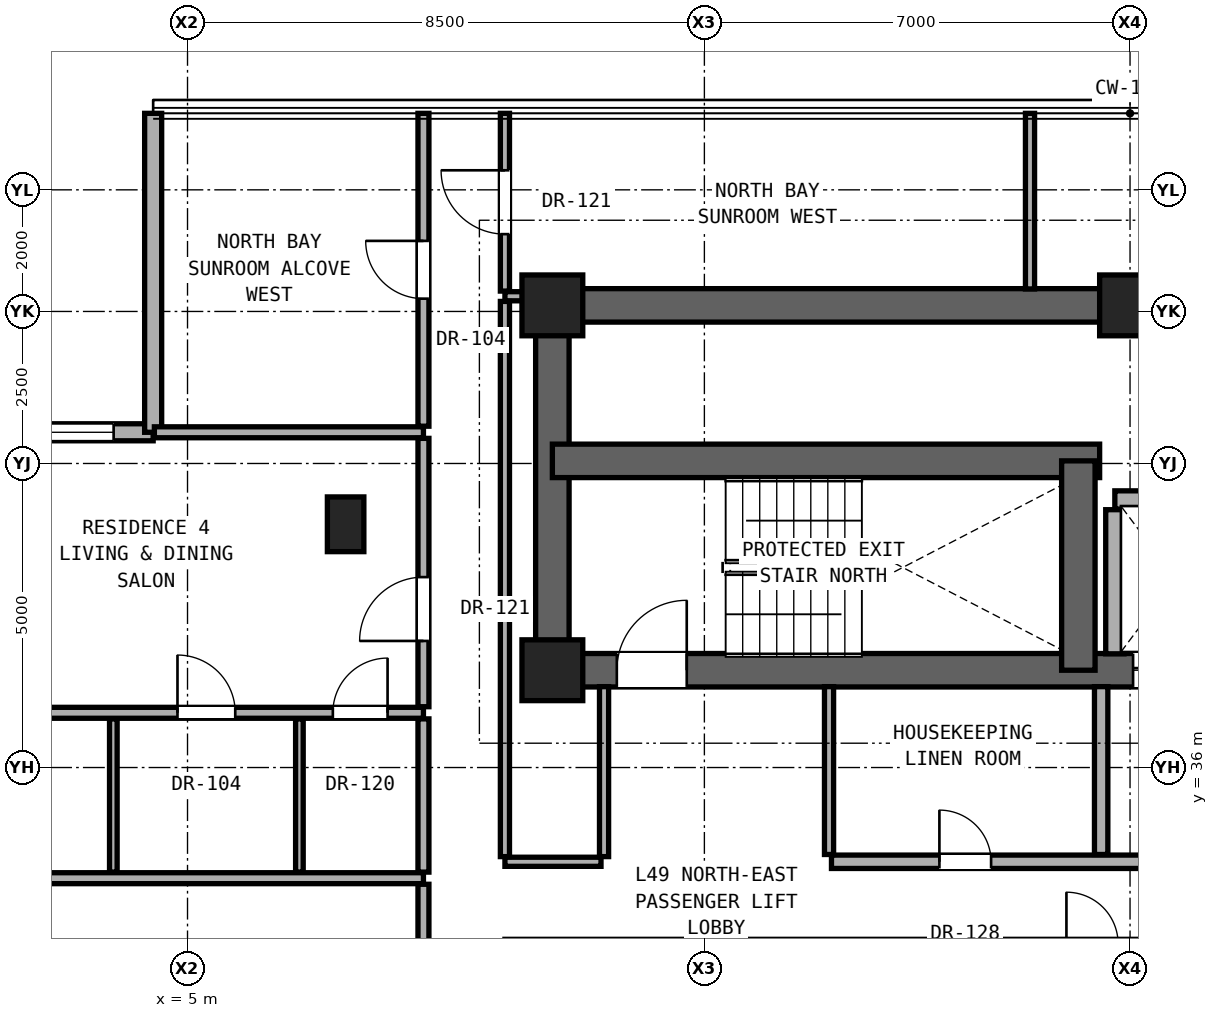
"""IFC4 building model, lengths in metres.
Left out: names, types, materials, properties, quantities, classifications, styles, units other than length and angle.
Written with IfcOpenShell. Run it as: python <this file> out.ifc"""

import sys

from ifc_helpers import new_model, si_unit, direction, frame, frame_2d, origin, origin_2d, place, context, subcontext, project, spatial, rectangle, extrude, element, fill, save


model = new_model("IFC4")
c1 = context("Model", 3, precision=1e-05, world=origin(), true_north=direction((0.0, 1.0)))
c2 = subcontext(c1, "Body", "Model", "MODEL_VIEW")
j1 = project(units=[si_unit("LENGTHUNIT", "METRE"), si_unit("PLANEANGLEUNIT", "RADIAN")], contexts=[c1])
p1 = place(None, origin())
s1 = spatial("IfcSite", under=j1, at=p1, CompositionType="ELEMENT")
p2 = place(p1, origin())
s2 = spatial("IfcBuilding", under=s1, at=p2, CompositionType="ELEMENT")
p3 = place(p2, frame((0.0, 0.0, 173.9)))
s3 = spatial("IfcBuildingStorey", under=s2, at=p3, CompositionType="ELEMENT", Elevation=173.9)
for number, where, z_axis, x_axis in (
    (1, (11.0, 37.6, 0.0), (0.0, 0.0, 1.0), (1.0, 0.0, 0.0)),
    (2, (11.0, 43.6, 0.0), (0.0, 0.0, 1.0), (1.0, 0.0, 0.0)),
    (3, (20.5, 43.6, 0.0), (0.0, 0.0, 1.0), (1.0, 0.0, 0.0)),
):
    element("IfcColumn", number, at=place(p3, frame(where, z_axis=z_axis, x_axis=x_axis)), inside=s3, PredefinedType="COLUMN", context=c2, shape_type="SweptSolid", body=[
        extrude(rectangle(XDim=1.0, YDim=1.0, at=origin_2d()), origin(), (0.0, 0.0, 1.0), 3.25),
    ])
p4 = place(p3, frame((7.6, 40.0, 0.0), z_axis=(0.0, 0.0, 1.0), x_axis=(1.0, 0.0, 0.0)))
e4 = element("IfcColumn", 4, at=p4, inside=s3, PredefinedType="PILASTER", context=c2, shape_type="SweptSolid", body=[
    extrude(rectangle(XDim=0.6, YDim=0.9, at=origin_2d()), origin(), (0.0, 0.0, 1.0), 3.25),
])
p5 = place(p3, frame((11.0, 43.6, 0.0), z_axis=(0.0, 0.0, 1.0), x_axis=(1.0, 0.0, 0.0)))
e5 = element("IfcWall", 5, at=p5, inside=s3, PredefinedType="SHEAR", context=c2, shape_type="SweptSolid", body=[
    extrude(rectangle(XDim=19.0, YDim=0.55, at=frame_2d((9.5, 0.0))), origin(), (0.0, 0.0, 1.0), 3.05),
])
p6 = place(p3, frame((11.0, 37.6, 0.0), z_axis=(0.0, 0.0, 1.0), x_axis=(0.0, 1.0, 0.0)))
e6 = element("IfcWall", 6, at=p6, inside=s3, PredefinedType="SHEAR", context=c2, shape_type="SweptSolid", body=[
    extrude(rectangle(XDim=6.0, YDim=0.55, at=frame_2d((3.0, 0.0))), origin(), (0.0, 0.0, 1.0), 3.05),
])
p7 = place(p3, frame((11.0, 37.6, 0.0), z_axis=(0.0, 0.0, 1.0), x_axis=(1.0, 0.0, 0.0)))
e7 = element("IfcWall", 7, at=p7, inside=s3, PredefinedType="SHEAR", context=c2, shape_type="SweptSolid", body=[
    extrude(rectangle(XDim=19.0, YDim=0.55, at=frame_2d((9.5, 0.0))), origin(), (0.0, 0.0, 1.0), 3.05),
])
p8 = place(p7, frame((1.06, 0.0, 0.0)))
e8 = element("IfcOpeningElement", 8, at=p8, cuts=e7, PredefinedType="OPENING", context=c2, shape_type="SweptSolid", body=[
    extrude(rectangle(XDim=1.15, YDim=2.2, at=frame_2d((0.575, 1.1))), frame((0.0, 0.285, 0.0), z_axis=(0.0, -1.0, 0.0), x_axis=(1.0, 0.0, 0.0)), (0.0, 0.0, 1.0), 0.57),
])
p9 = place(p7, frame((9.55, 0.0, 0.0)))
e9 = element("IfcOpeningElement", 9, at=p9, cuts=e7, PredefinedType="OPENING", context=c2, shape_type="SweptSolid", body=[
    extrude(rectangle(XDim=1.4, YDim=2.35, at=frame_2d((0.7, 1.175))), frame((0.0, 0.285, 0.0), z_axis=(0.0, -1.0, 0.0), x_axis=(1.0, 0.0, 0.0)), (0.0, 0.0, 1.0), 0.57),
])
p10 = place(p7, frame((11.95, 0.0, 0.0)))
e10 = element("IfcOpeningElement", 10, at=p10, cuts=e7, PredefinedType="OPENING", context=c2, shape_type="SweptSolid", body=[
    extrude(rectangle(XDim=1.4, YDim=2.35, at=frame_2d((0.7, 1.175))), frame((0.0, 0.285, 0.0), z_axis=(0.0, -1.0, 0.0), x_axis=(1.0, 0.0, 0.0)), (0.0, 0.0, 1.0), 0.57),
])
p11 = place(p3, frame((11.0, 41.043, 0.0), z_axis=(0.0, 0.0, 1.0), x_axis=(1.0, 0.0, 0.0)))
e11 = element("IfcWall", 11, at=p11, inside=s3, PredefinedType="SHEAR", context=c2, shape_type="SweptSolid", body=[
    extrude(rectangle(XDim=9.0, YDim=0.55, at=frame_2d((4.5, 0.0))), origin(), (0.0, 0.0, 1.0), 3.05),
])
p12 = place(p3, frame((19.65, 37.6, 0.0), z_axis=(0.0, 0.0, 1.0), x_axis=(0.0, 1.0, 0.0)))
e12 = element("IfcWall", 12, at=p12, inside=s3, PredefinedType="SHEAR", context=c2, shape_type="SweptSolid", body=[
    extrude(rectangle(XDim=3.443, YDim=0.55, at=frame_2d((1.721, 0.0))), origin(), (0.0, 0.0, 1.0), 3.05),
])
p13 = place(p3, frame((4.435, 41.513, 0.0), z_axis=(0.0, 0.0, 1.0), x_axis=(-1.0, 0.0, 0.0)))
e13 = element("IfcWall", 13, at=p13, inside=s3, PredefinedType="SOLIDWALL", context=c2, shape_type="SweptSolid", body=[
    extrude(rectangle(XDim=5.245, YDim=0.28, at=frame_2d((2.623, 0.0))), origin(), (0.0, 0.0, 1.0), 3.03),
])
p14 = place(p13, frame((0.65, 0.0, 0.85)))
e14 = element("IfcOpeningElement", 14, at=p14, cuts=e13, PredefinedType="OPENING", context=c2, shape_type="SweptSolid", body=[
    extrude(rectangle(XDim=1.1, YDim=2.0, at=frame_2d((0.55, 1.0))), frame((0.0, 0.15, 0.0), z_axis=(0.0, -1.0, 0.0), x_axis=(1.0, 0.0, 0.0)), (0.0, 0.0, 1.0), 0.3),
])
p15 = place(p3, frame((4.435, 46.758, 0.0), z_axis=(0.0, 0.0, 1.0), x_axis=(0.0, -1.0, 0.0)))
e15 = element("IfcWall", 15, at=p15, inside=s3, PredefinedType="SOLIDWALL", context=c2, shape_type="SweptSolid", body=[
    extrude(rectangle(XDim=5.245, YDim=0.28, at=frame_2d((2.623, 0.0))), origin(), (0.0, 0.0, 1.0), 3.03),
])
p16 = place(p3, frame((-0.81, 34.18, 0.0), z_axis=(0.0, 0.0, 1.0), x_axis=(1.0, 0.0, 0.0)))
e16 = element("IfcWall", 16, at=p16, inside=s3, PredefinedType="PARTITIONING", context=c2, shape_type="SweptSolid", body=[
    extrude(rectangle(XDim=9.69, YDim=0.18, at=frame_2d((4.845, 0.0))), origin(), (0.0, 0.0, 1.0), 2.269),
])
p17 = place(p3, frame((10.22, 34.45, 0.0), z_axis=(0.0, 0.0, 1.0), x_axis=(1.0, 0.0, 0.0)))
e17 = element("IfcWall", 17, at=p17, inside=s3, PredefinedType="PARTITIONING", context=c2, shape_type="SweptSolid", body=[
    extrude(rectangle(XDim=1.58, YDim=0.15, at=frame_2d((0.79, 0.0))), origin(), (0.0, 0.0, 1.0), 2.186),
])
p18 = place(p3, frame((15.59, 34.45, 0.0), z_axis=(0.0, 0.0, 1.0), x_axis=(1.0, 0.0, 0.0)))
e18 = element("IfcWall", 18, at=p18, inside=s3, PredefinedType="SOLIDWALL", context=c2, shape_type="SweptSolid", body=[
    extrude(rectangle(XDim=15.19, YDim=0.22, at=frame_2d((7.595, 0.0))), origin(), (0.0, 0.0, 1.0), 2.186),
])
p19 = place(p18, frame((6.435, 0.0, 0.0)))
e19 = element("IfcOpeningElement", 19, at=p19, cuts=e18, PredefinedType="OPENING", context=c2, shape_type="SweptSolid", body=[
    extrude(rectangle(XDim=0.85, YDim=2.01, at=frame_2d((0.425, 1.005))), frame((0.0, 0.12, 0.0), z_axis=(0.0, -1.0, 0.0), x_axis=(1.0, 0.0, 0.0)), (0.0, 0.0, 1.0), 0.24),
])
p20 = place(p18, frame((11.085, 0.0, 0.0)))
e20 = element("IfcOpeningElement", 20, at=p20, cuts=e18, PredefinedType="OPENING", context=c2, shape_type="SweptSolid", body=[
    extrude(rectangle(XDim=0.95, YDim=2.15, at=frame_2d((0.475, 1.075))), frame((0.0, 0.12, 0.0), z_axis=(0.0, -1.0, 0.0), x_axis=(1.0, 0.0, 0.0)), (0.0, 0.0, 1.0), 0.24),
])
p21 = place(p18, frame((1.775, 0.0, 0.0)))
e21 = element("IfcOpeningElement", 21, at=p21, cuts=e18, PredefinedType="OPENING", context=c2, shape_type="SweptSolid", body=[
    extrude(rectangle(XDim=0.85, YDim=2.01, at=frame_2d((0.425, 1.005))), frame((0.0, 0.12, 0.0), z_axis=(0.0, -1.0, 0.0), x_axis=(1.0, 0.0, 0.0)), (0.0, 0.0, 1.0), 0.24),
])
p22 = place(p3, frame((-0.81, 36.9, 0.0), z_axis=(0.0, 0.0, 1.0), x_axis=(1.0, 0.0, 0.0)))
e22 = element("IfcWall", 22, at=p22, inside=s3, PredefinedType="PARTITIONING", context=c2, shape_type="SweptSolid", body=[
    extrude(rectangle(XDim=9.69, YDim=0.18, at=frame_2d((4.845, 0.0))), origin(), (0.0, 0.0, 1.0), 2.269),
])
p23 = place(p22, frame((1.24, 0.0, 0.0)))
e23 = element("IfcOpeningElement", 23, at=p23, cuts=e22, PredefinedType="OPENING", context=c2, shape_type="SweptSolid", body=[
    extrude(rectangle(XDim=0.95, YDim=2.15, at=frame_2d((0.475, 1.075))), frame((0.0, 0.1, 0.0), z_axis=(0.0, -1.0, 0.0), x_axis=(1.0, 0.0, 0.0)), (0.0, 0.0, 1.0), 0.2),
])
p24 = place(p22, frame((5.645, 0.0, 0.0)))
e24 = element("IfcOpeningElement", 24, at=p24, cuts=e22, PredefinedType="OPENING", context=c2, shape_type="SweptSolid", body=[
    extrude(rectangle(XDim=0.95, YDim=2.15, at=frame_2d((0.475, 1.075))), frame((0.0, 0.1, 0.0), z_axis=(0.0, -1.0, 0.0), x_axis=(1.0, 0.0, 0.0)), (0.0, 0.0, 1.0), 0.2),
])
p25 = place(p22, frame((8.2, 0.0, 0.0)))
e25 = element("IfcOpeningElement", 25, at=p25, cuts=e22, PredefinedType="OPENING", context=c2, shape_type="SweptSolid", body=[
    extrude(rectangle(XDim=0.9, YDim=2.1, at=frame_2d((0.45, 1.05))), frame((0.0, 0.1, 0.0), z_axis=(0.0, -1.0, 0.0), x_axis=(1.0, 0.0, 0.0)), (0.0, 0.0, 1.0), 0.2),
])
p26 = place(p3, frame((20.25, 40.4, 0.0), z_axis=(0.0, 0.0, 1.0), x_axis=(1.0, 0.0, 0.0)))
e26 = element("IfcWall", 26, at=p26, inside=s3, PredefinedType="SOLIDWALL", context=c2, shape_type="SweptSolid", body=[
    extrude(rectangle(XDim=4.4, YDim=0.3, at=frame_2d((2.2, 0.0))), origin(), (0.0, 0.0, 1.0), 3.05),
])
p27 = place(p3, frame((4.455, 41.513, 0.0), z_axis=(0.0, 0.0, 1.0), x_axis=(1.0, 0.0, 0.0)))
e27 = element("IfcWall", 27, at=p27, inside=s3, PredefinedType="PARTITIONING", context=c2, shape_type="SweptSolid", body=[
    extrude(rectangle(XDim=4.425, YDim=0.18, at=frame_2d((2.212, 0.0))), origin(), (0.0, 0.0, 1.0), 3.05),
])
p28 = place(p3, frame((10.22, 43.75, 0.0), z_axis=(0.0, 0.0, 1.0), x_axis=(1.0, 0.0, 0.0)))
e28 = element("IfcWall", 28, at=p28, inside=s3, PredefinedType="PARTITIONING", context=c2, shape_type="SweptSolid", body=[
    extrude(rectangle(XDim=0.51, YDim=0.15, at=frame_2d((0.255, 0.0))), origin(), (0.0, 0.0, 1.0), 3.05),
])
for number, where, z_axis, x_axis in (
    (29, (3.78, 34.28, 0.0), (0.0, 0.0, 1.0), (0.0, 1.0, 0.0)),
    (30, (6.84, 34.28, 0.0), (0.0, 0.0, 1.0), (0.0, 1.0, 0.0)),
):
    element("IfcWall", number, at=place(p3, frame(where, z_axis=z_axis, x_axis=x_axis)), inside=s3, PredefinedType="PARTITIONING", context=c2, shape_type="SweptSolid", body=[
        extrude(rectangle(XDim=2.52, YDim=0.125, at=frame_2d((1.26, 0.0))), origin(), (0.0, 0.0, 1.0), 3.05),
    ])
p29 = place(p3, frame((8.88, 30.633, 0.0), z_axis=(0.0, 0.0, 1.0), x_axis=(0.0, 1.0, 0.0)))
e31 = element("IfcWall", 31, at=p29, inside=s3, PredefinedType="PARTITIONING", context=c2, shape_type="SweptSolid", body=[
    extrude(rectangle(XDim=3.447, YDim=0.18, at=frame_2d((1.724, 0.0))), origin(), (0.0, 0.0, 1.0), 2.346),
])
p30 = place(p29, frame((1.198, 0.0, 0.0)))
e32 = element("IfcOpeningElement", 32, at=p30, cuts=e31, PredefinedType="OPENING", context=c2, shape_type="SweptSolid", body=[
    extrude(rectangle(XDim=1.05, YDim=2.2, at=frame_2d((0.525, 1.1))), frame((0.0, 0.1, 0.0), z_axis=(0.0, -1.0, 0.0), x_axis=(1.0, 0.0, 0.0)), (0.0, 0.0, 1.0), 0.2),
])
p31 = place(p3, frame((8.88, 34.28, 0.0), z_axis=(0.0, 0.0, 1.0), x_axis=(0.0, 1.0, 0.0)))
e33 = element("IfcWall", 33, at=p31, inside=s3, PredefinedType="PARTITIONING", context=c2, shape_type="SweptSolid", body=[
    extrude(rectangle(XDim=2.52, YDim=0.18, at=frame_2d((1.26, 0.0))), origin(), (0.0, 0.0, 1.0), 3.05),
])
p32 = place(p3, frame((8.88, 37.0, 0.0), z_axis=(0.0, 0.0, 1.0), x_axis=(0.0, 1.0, 0.0)))
e34 = element("IfcWall", 34, at=p32, inside=s3, PredefinedType="PARTITIONING", context=c2, shape_type="SweptSolid", body=[
    extrude(rectangle(XDim=4.413, YDim=0.18, at=frame_2d((2.207, 0.0))), origin(), (0.0, 0.0, 1.0), 2.442),
])
p33 = place(p32, frame((1.082, 0.0, 0.0)))
e35 = element("IfcOpeningElement", 35, at=p33, cuts=e34, PredefinedType="OPENING", context=c2, shape_type="SweptSolid", body=[
    extrude(rectangle(XDim=1.05, YDim=2.2, at=frame_2d((0.525, 1.1))), frame((0.0, 0.1, 0.0), z_axis=(0.0, -1.0, 0.0), x_axis=(1.0, 0.0, 0.0)), (0.0, 0.0, 1.0), 0.2),
])
p34 = place(p3, frame((8.88, 41.613, 0.0), z_axis=(0.0, 0.0, 1.0), x_axis=(0.0, 1.0, 0.0)))
e36 = element("IfcWall", 36, at=p34, inside=s3, PredefinedType="PARTITIONING", context=c2, shape_type="SweptSolid", body=[
    extrude(rectangle(XDim=5.145, YDim=0.18, at=frame_2d((2.573, 0.0))), origin(), (0.0, 0.0, 1.0), 3.05),
])
p35 = place(p34, frame((2.097, 0.0, 0.0)))
e37 = element("IfcOpeningElement", 37, at=p35, cuts=e36, PredefinedType="OPENING", context=c2, shape_type="SweptSolid", body=[
    extrude(rectangle(XDim=0.95, YDim=2.15, at=frame_2d((0.475, 1.075))), frame((0.0, 0.1, 0.0), z_axis=(0.0, -1.0, 0.0), x_axis=(1.0, 0.0, 0.0)), (0.0, 0.0, 1.0), 0.2),
])
p36 = place(p3, frame((10.22, 34.535, 0.0), z_axis=(0.0, 0.0, 1.0), x_axis=(0.0, 1.0, 0.0)))
e38 = element("IfcWall", 38, at=p36, inside=s3, PredefinedType="PARTITIONING", context=c2, shape_type="SweptSolid", body=[
    extrude(rectangle(XDim=9.13, YDim=0.15, at=frame_2d((4.565, 0.0))), origin(), (0.0, 0.0, 1.0), 2.442),
])
p37 = place(p3, frame((10.22, 43.835, 0.0), z_axis=(0.0, 0.0, 1.0), x_axis=(0.0, 1.0, 0.0)))
e39 = element("IfcWall", 39, at=p37, inside=s3, PredefinedType="PARTITIONING", context=c2, shape_type="SweptSolid", body=[
    extrude(rectangle(XDim=2.923, YDim=0.15, at=frame_2d((1.461, 0.0))), origin(), (0.0, 0.0, 1.0), 3.05),
])
p38 = place(p37, frame((0.937, 0.0, 0.0)))
e40 = element("IfcOpeningElement", 40, at=p38, cuts=e39, PredefinedType="OPENING", context=c2, shape_type="SweptSolid", body=[
    extrude(rectangle(XDim=1.05, YDim=2.2, at=frame_2d((0.525, 1.1))), frame((0.0, 0.085, 0.0), z_axis=(0.0, -1.0, 0.0), x_axis=(1.0, 0.0, 0.0)), (0.0, 0.0, 1.0), 0.17),
])
p39 = place(p3, frame((11.85, 34.535, 0.0), z_axis=(0.0, 0.0, 1.0), x_axis=(0.0, 1.0, 0.0)))
e41 = element("IfcWall", 41, at=p39, inside=s3, PredefinedType="PARTITIONING", context=c2, shape_type="SweptSolid", body=[
    extrude(rectangle(XDim=2.795, YDim=0.15, at=frame_2d((1.397, 0.0))), origin(), (0.0, 0.0, 1.0), 3.05),
])
p40 = place(p3, frame((15.55, 34.57, 0.0), z_axis=(0.0, 0.0, 1.0), x_axis=(0.0, 1.0, 0.0)))
e42 = element("IfcWall", 42, at=p40, inside=s3, PredefinedType="PARTITIONING", context=c2, shape_type="SweptSolid", body=[
    extrude(rectangle(XDim=2.76, YDim=0.15, at=frame_2d((1.38, 0.0))), origin(), (0.0, 0.0, 1.0), 3.05),
])
p41 = place(p3, frame((18.855, 43.87, 0.0), z_axis=(0.0, 0.0, 1.0), x_axis=(0.0, 1.0, 0.0)))
e43 = element("IfcWall", 43, at=p41, inside=s3, PredefinedType="PARTITIONING", context=c2, shape_type="SweptSolid", body=[
    extrude(rectangle(XDim=2.888, YDim=0.15, at=frame_2d((1.444, 0.0))), origin(), (0.0, 0.0, 1.0), 3.05),
])
p42 = place(p3, frame((20.025, 34.57, 0.0), z_axis=(0.0, 0.0, 1.0), x_axis=(0.0, 1.0, 0.0)))
e44 = element("IfcWall", 44, at=p42, inside=s3, PredefinedType="SOLIDWALL", context=c2, shape_type="SweptSolid", body=[
    extrude(rectangle(XDim=2.76, YDim=0.22, at=frame_2d((1.38, 0.0))), origin(), (0.0, 0.0, 1.0), 3.05),
])
p43 = place(p3, frame((20.25, 37.87, 0.0), z_axis=(0.0, 0.0, 1.0), x_axis=(0.0, 1.0, 0.0)))
e45 = element("IfcWall", 45, at=p43, inside=s3, PredefinedType="SOLIDWALL", context=c2, shape_type="SweptSolid", body=[
    extrude(rectangle(XDim=2.37, YDim=0.3, at=frame_2d((1.185, 0.0))), origin(), (0.0, 0.0, 1.0), 3.05),
])
p44 = place(p14, origin())
e46 = element("IfcWindow", 46, at=p44, inside=s3, PartitioningType="SINGLE_PANEL", PredefinedType="WINDOW", context=c2, shape_type="SweptSolid", body=[
    extrude(rectangle(XDim=1.1, YDim=2.0, at=frame_2d((0.55, 1.0))), frame((0.0, 0.03, 0.0), z_axis=(0.0, -1.0, 0.0), x_axis=(1.0, 0.0, 0.0)), (0.0, 0.0, 1.0), 0.06),
])
fill(e14, e46)
p45 = place(p8, origin())
e47 = element("IfcDoor", 47, at=p45, inside=s3, OperationType="SINGLE_SWING_RIGHT", PredefinedType="DOOR", context=c2, shape_type="SweptSolid", body=[
    extrude(rectangle(XDim=1.15, YDim=2.2, at=frame_2d((0.575, 1.1))), frame((0.0, 0.025, 0.0), z_axis=(0.0, -1.0, 0.0), x_axis=(1.0, 0.0, 0.0)), (0.0, 0.0, 1.0), 0.05),
])
fill(e8, e47)
p46 = place(p21, origin())
e48 = element("IfcDoor", 48, at=p46, inside=s3, OperationType="SINGLE_SWING_LEFT", PredefinedType="DOOR", context=c2, shape_type="SweptSolid", body=[
    extrude(rectangle(XDim=0.85, YDim=2.01, at=frame_2d((0.425, 1.005))), frame((0.0, 0.025, 0.0), z_axis=(0.0, -1.0, 0.0), x_axis=(1.0, 0.0, 0.0)), (0.0, 0.0, 1.0), 0.05),
])
fill(e21, e48)
p47 = place(p33, origin())
e49 = element("IfcDoor", 49, at=p47, inside=s3, OperationType="SINGLE_SWING_LEFT", PredefinedType="DOOR", context=c2, shape_type="SweptSolid", body=[
    extrude(rectangle(XDim=1.05, YDim=2.2, at=frame_2d((0.525, 1.1))), frame((0.0, 0.025, 0.0), z_axis=(0.0, -1.0, 0.0), x_axis=(1.0, 0.0, 0.0)), (0.0, 0.0, 1.0), 0.05),
])
fill(e35, e49)
p48 = place(p24, origin())
e50 = element("IfcDoor", 50, at=p48, inside=s3, OperationType="SINGLE_SWING_LEFT", PredefinedType="DOOR", context=c2, shape_type="SweptSolid", body=[
    extrude(rectangle(XDim=0.95, YDim=2.15, at=frame_2d((0.475, 1.075))), frame((0.0, 0.025, 0.0), z_axis=(0.0, -1.0, 0.0), x_axis=(1.0, 0.0, 0.0)), (0.0, 0.0, 1.0), 0.05),
])
fill(e24, e50)
p49 = place(p25, origin())
e51 = element("IfcDoor", 51, at=p49, inside=s3, OperationType="SINGLE_SWING_RIGHT", PredefinedType="DOOR", context=c2, shape_type="SweptSolid", body=[
    extrude(rectangle(XDim=0.9, YDim=2.1, at=frame_2d((0.45, 1.05))), frame((0.0, 0.025, 0.0), z_axis=(0.0, -1.0, 0.0), x_axis=(1.0, 0.0, 0.0)), (0.0, 0.0, 1.0), 0.05),
])
fill(e25, e51)
p50 = place(p38, origin())
e52 = element("IfcDoor", 52, at=p50, inside=s3, OperationType="SINGLE_SWING_RIGHT", PredefinedType="DOOR", context=c2, shape_type="SweptSolid", body=[
    extrude(rectangle(XDim=1.05, YDim=2.2, at=frame_2d((0.525, 1.1))), frame((0.0, 0.025, 0.0), z_axis=(0.0, -1.0, 0.0), x_axis=(1.0, 0.0, 0.0)), (0.0, 0.0, 1.0), 0.05),
])
fill(e40, e52)
p51 = place(p35, origin())
e53 = element("IfcDoor", 53, at=p51, inside=s3, OperationType="SINGLE_SWING_RIGHT", PredefinedType="DOOR", context=c2, shape_type="SweptSolid", body=[
    extrude(rectangle(XDim=0.95, YDim=2.15, at=frame_2d((0.475, 1.075))), frame((0.0, 0.025, 0.0), z_axis=(0.0, -1.0, 0.0), x_axis=(1.0, 0.0, 0.0)), (0.0, 0.0, 1.0), 0.05),
])
fill(e37, e53)
p52 = place(p9, origin())
e54 = element("IfcDoor", 54, at=p52, inside=s3, OperationType="DOUBLE_DOOR_SLIDING", PredefinedType="DOOR", context=c2, shape_type="SweptSolid", body=[
    extrude(rectangle(XDim=1.4, YDim=2.35, at=frame_2d((0.7, 1.175))), frame((0.0, 0.025, 0.0), z_axis=(0.0, -1.0, 0.0), x_axis=(1.0, 0.0, 0.0)), (0.0, 0.0, 1.0), 0.05),
])
fill(e9, e54)
save(model, sys.argv[1])
